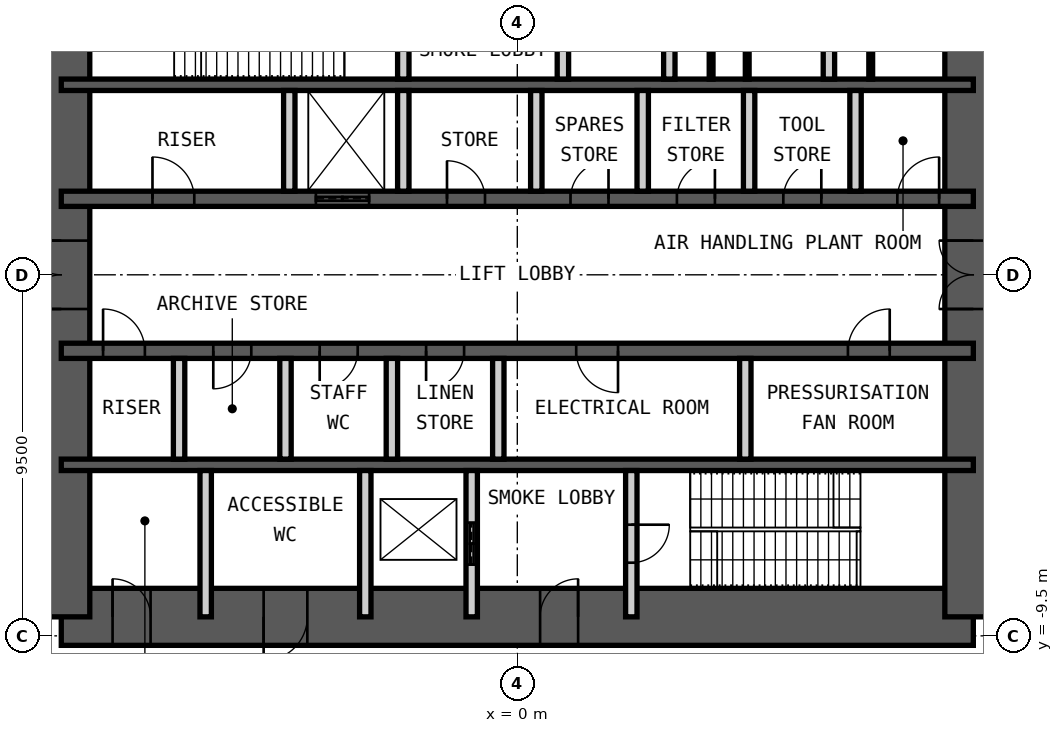
"""IFC4 building model, lengths in metres.
Left out: names, types, materials, properties, quantities, classifications, styles, units other than length and angle.
Written with IfcOpenShell. Run it as: python <this file> out.ifc"""

import sys

from ifc_helpers import new_model, si_unit, direction, frame, frame_2d, origin, place, context, subcontext, project, spatial, rectangle, extrude, element, fill, save


model = new_model("IFC4")
c1 = context("Model", 3, precision=1e-05, world=origin(), true_north=direction((0.0, 1.0)))
c2 = subcontext(c1, "Body", "Model", "MODEL_VIEW")
j1 = project(units=[si_unit("LENGTHUNIT", "METRE"), si_unit("PLANEANGLEUNIT", "RADIAN")], contexts=[c1])
p1 = place(None, origin())
s1 = spatial("IfcSite", under=j1, at=p1, CompositionType="ELEMENT")
p2 = place(p1, origin())
s2 = spatial("IfcBuilding", under=s1, at=p2, CompositionType="ELEMENT")
p3 = place(p2, frame((0.0, 0.0, -12.0)))
s3 = spatial("IfcBuildingStorey", under=s2, at=p3, CompositionType="ELEMENT", Elevation=-12.0)
p4 = place(p3, frame((-12.0, -9.0, -0.2), z_axis=(0.0, 0.0, 1.0), x_axis=(1.0, 0.0, 0.0)))
e1 = element("IfcWall", 1, at=p4, inside=s3, PredefinedType="SHEAR", context=c2, shape_type="SweptSolid", body=[
    extrude(rectangle(XDim=24.0, YDim=1.5, at=frame_2d((12.0, 0.0))), origin(), (0.0, 0.0, 1.0), 6.2),
])
p5 = place(p4, frame((1.35, 0.0, 0.2)))
e2 = element("IfcOpeningElement", 2, at=p5, cuts=e1, PredefinedType="OPENING", context=c2, shape_type="SweptSolid", body=[
    extrude(rectangle(XDim=1.0, YDim=2.1, at=frame_2d((0.5, 1.05))), frame((0.0, 0.76, 0.0), z_axis=(0.0, -1.0, 0.0), x_axis=(1.0, 0.0, 0.0)), (0.0, 0.0, 1.0), 1.52),
])
p6 = place(p4, frame((5.325, 0.0, 0.2)))
e3 = element("IfcOpeningElement", 3, at=p6, cuts=e1, PredefinedType="OPENING", context=c2, shape_type="SweptSolid", body=[
    extrude(rectangle(XDim=1.15, YDim=2.1, at=frame_2d((0.575, 1.05))), frame((0.0, 0.76, 0.0), z_axis=(0.0, -1.0, 0.0), x_axis=(1.0, 0.0, 0.0)), (0.0, 0.0, 1.0), 1.52),
])
p7 = place(p4, frame((12.6, 0.0, 0.2)))
e4 = element("IfcOpeningElement", 4, at=p7, cuts=e1, PredefinedType="OPENING", context=c2, shape_type="SweptSolid", body=[
    extrude(rectangle(XDim=1.0, YDim=2.1, at=frame_2d((0.5, 1.05))), frame((0.0, 0.76, 0.0), z_axis=(0.0, -1.0, 0.0), x_axis=(1.0, 0.0, 0.0)), (0.0, 0.0, 1.0), 1.52),
])
p8 = place(p3, frame((12.0, -9.0, -0.2), z_axis=(0.0, 0.0, 1.0), x_axis=(0.0, 1.0, 0.0)))
e5 = element("IfcWall", 5, at=p8, inside=s3, PredefinedType="SHEAR", context=c2, shape_type="SweptSolid", body=[
    extrude(rectangle(XDim=18.0, YDim=1.5, at=frame_2d((9.0, 0.0))), origin(), (0.0, 0.0, 1.0), 6.2),
])
p9 = place(p8, frame((8.1, 0.0, 0.2)))
e6 = element("IfcOpeningElement", 6, at=p9, cuts=e5, PredefinedType="OPENING", context=c2, shape_type="SweptSolid", body=[
    extrude(rectangle(XDim=1.8, YDim=2.1, at=frame_2d((0.9, 1.05))), frame((0.0, 0.76, 0.0), z_axis=(0.0, -1.0, 0.0), x_axis=(1.0, 0.0, 0.0)), (0.0, 0.0, 1.0), 1.52),
])
p10 = place(p3, frame((-12.0, -9.0, -0.2), z_axis=(0.0, 0.0, 1.0), x_axis=(0.0, 1.0, 0.0)))
e7 = element("IfcWall", 7, at=p10, inside=s3, PredefinedType="SHEAR", context=c2, shape_type="SweptSolid", body=[
    extrude(rectangle(XDim=18.0, YDim=1.5, at=frame_2d((9.0, 0.0))), origin(), (0.0, 0.0, 1.0), 6.2),
])
p11 = place(p10, frame((8.1, 0.0, 0.2)))
e8 = element("IfcOpeningElement", 8, at=p11, cuts=e7, PredefinedType="OPENING", context=c2, shape_type="SweptSolid", body=[
    extrude(rectangle(XDim=1.8, YDim=2.1, at=frame_2d((0.9, 1.05))), frame((0.0, 0.76, 0.0), z_axis=(0.0, -1.0, 0.0), x_axis=(1.0, 0.0, 0.0)), (0.0, 0.0, 1.0), 1.52),
])
p12 = place(p3, frame((-12.0, 5.0, -0.2), z_axis=(0.0, 0.0, 1.0), x_axis=(1.0, 0.0, 0.0)))
e9 = element("IfcWall", 9, at=p12, inside=s3, PredefinedType="SHEAR", context=c2, shape_type="SweptSolid", body=[
    extrude(rectangle(XDim=24.0, YDim=0.3, at=frame_2d((12.0, 0.0))), origin(), (0.0, 0.0, 1.0), 6.2),
])
p13 = place(p3, frame((-12.0, 2.0, -0.2), z_axis=(0.0, 0.0, 1.0), x_axis=(1.0, 0.0, 0.0)))
e10 = element("IfcWall", 10, at=p13, inside=s3, PredefinedType="SHEAR", context=c2, shape_type="SweptSolid", body=[
    extrude(rectangle(XDim=24.0, YDim=0.4, at=frame_2d((12.0, 0.0))), origin(), (0.0, 0.0, 1.0), 6.2),
])
p14 = place(p13, frame((2.4, 0.0, 0.2)))
e11 = element("IfcOpeningElement", 11, at=p14, cuts=e10, PredefinedType="OPENING", context=c2, shape_type="SweptSolid", body=[
    extrude(rectangle(XDim=1.1, YDim=2.1, at=frame_2d((0.55, 1.05))), frame((0.0, 0.21, 0.0), z_axis=(0.0, -1.0, 0.0), x_axis=(1.0, 0.0, 0.0)), (0.0, 0.0, 1.0), 0.42),
])
p15 = place(p13, frame((22.0, 0.0, 0.2)))
e12 = element("IfcOpeningElement", 12, at=p15, cuts=e10, PredefinedType="OPENING", context=c2, shape_type="SweptSolid", body=[
    extrude(rectangle(XDim=1.1, YDim=2.1, at=frame_2d((0.55, 1.05))), frame((0.0, 0.21, 0.0), z_axis=(0.0, -1.0, 0.0), x_axis=(1.0, 0.0, 0.0)), (0.0, 0.0, 1.0), 0.42),
])
p16 = place(p13, frame((10.15, 0.0, 0.2)))
e13 = element("IfcOpeningElement", 13, at=p16, cuts=e10, PredefinedType="OPENING", context=c2, shape_type="SweptSolid", body=[
    extrude(rectangle(XDim=1.0, YDim=2.1, at=frame_2d((0.5, 1.05))), frame((0.0, 0.21, 0.0), z_axis=(0.0, -1.0, 0.0), x_axis=(1.0, 0.0, 0.0)), (0.0, 0.0, 1.0), 0.42),
])
p17 = place(p13, frame((6.7, 0.0, 0.2)))
e14 = element("IfcOpeningElement", 14, at=p17, cuts=e10, PredefinedType="OPENING", context=c2, shape_type="SweptSolid", body=[
    extrude(rectangle(XDim=1.4, YDim=2.4, at=frame_2d((0.7, 1.2))), frame((0.0, 0.21, 0.0), z_axis=(0.0, -1.0, 0.0), x_axis=(1.0, 0.0, 0.0)), (0.0, 0.0, 1.0), 0.42),
])
p18 = place(p13, frame((13.4, 0.0, 0.2)))
e15 = element("IfcOpeningElement", 15, at=p18, cuts=e10, PredefinedType="OPENING", context=c2, shape_type="SweptSolid", body=[
    extrude(rectangle(XDim=1.0, YDim=2.1, at=frame_2d((0.5, 1.05))), frame((0.0, 0.21, 0.0), z_axis=(0.0, -1.0, 0.0), x_axis=(1.0, 0.0, 0.0)), (0.0, 0.0, 1.0), 0.42),
])
p19 = place(p13, frame((16.2, 0.0, 0.2)))
e16 = element("IfcOpeningElement", 16, at=p19, cuts=e10, PredefinedType="OPENING", context=c2, shape_type="SweptSolid", body=[
    extrude(rectangle(XDim=1.0, YDim=2.1, at=frame_2d((0.5, 1.05))), frame((0.0, 0.21, 0.0), z_axis=(0.0, -1.0, 0.0), x_axis=(1.0, 0.0, 0.0)), (0.0, 0.0, 1.0), 0.42),
])
p20 = place(p13, frame((19.0, 0.0, 0.2)))
e17 = element("IfcOpeningElement", 17, at=p20, cuts=e10, PredefinedType="OPENING", context=c2, shape_type="SweptSolid", body=[
    extrude(rectangle(XDim=1.0, YDim=2.1, at=frame_2d((0.5, 1.05))), frame((0.0, 0.21, 0.0), z_axis=(0.0, -1.0, 0.0), x_axis=(1.0, 0.0, 0.0)), (0.0, 0.0, 1.0), 0.42),
])
p21 = place(p3, frame((-12.0, -2.0, -0.2), z_axis=(0.0, 0.0, 1.0), x_axis=(1.0, 0.0, 0.0)))
e18 = element("IfcWall", 18, at=p21, inside=s3, PredefinedType="SHEAR", context=c2, shape_type="SweptSolid", body=[
    extrude(rectangle(XDim=24.0, YDim=0.4, at=frame_2d((12.0, 0.0))), origin(), (0.0, 0.0, 1.0), 6.2),
])
p22 = place(p21, frame((1.1, 0.0, 0.2)))
e19 = element("IfcOpeningElement", 19, at=p22, cuts=e18, PredefinedType="OPENING", context=c2, shape_type="SweptSolid", body=[
    extrude(rectangle(XDim=1.1, YDim=2.1, at=frame_2d((0.55, 1.05))), frame((0.0, 0.21, 0.0), z_axis=(0.0, -1.0, 0.0), x_axis=(1.0, 0.0, 0.0)), (0.0, 0.0, 1.0), 0.42),
])
p23 = place(p21, frame((13.55, 0.0, 0.2)))
e20 = element("IfcOpeningElement", 20, at=p23, cuts=e18, PredefinedType="OPENING", context=c2, shape_type="SweptSolid", body=[
    extrude(rectangle(XDim=1.1, YDim=2.1, at=frame_2d((0.55, 1.05))), frame((0.0, 0.21, 0.0), z_axis=(0.0, -1.0, 0.0), x_axis=(1.0, 0.0, 0.0)), (0.0, 0.0, 1.0), 0.42),
])
p24 = place(p21, frame((20.7, 0.0, 0.2)))
e21 = element("IfcOpeningElement", 21, at=p24, cuts=e18, PredefinedType="OPENING", context=c2, shape_type="SweptSolid", body=[
    extrude(rectangle(XDim=1.1, YDim=2.1, at=frame_2d((0.55, 1.05))), frame((0.0, 0.21, 0.0), z_axis=(0.0, -1.0, 0.0), x_axis=(1.0, 0.0, 0.0)), (0.0, 0.0, 1.0), 0.42),
])
p25 = place(p21, frame((4.0, 0.0, 0.2)))
e22 = element("IfcOpeningElement", 22, at=p25, cuts=e18, PredefinedType="OPENING", context=c2, shape_type="SweptSolid", body=[
    extrude(rectangle(XDim=1.0, YDim=2.1, at=frame_2d((0.5, 1.05))), frame((0.0, 0.21, 0.0), z_axis=(0.0, -1.0, 0.0), x_axis=(1.0, 0.0, 0.0)), (0.0, 0.0, 1.0), 0.42),
])
p26 = place(p21, frame((6.8, 0.0, 0.2)))
e23 = element("IfcOpeningElement", 23, at=p26, cuts=e18, PredefinedType="OPENING", context=c2, shape_type="SweptSolid", body=[
    extrude(rectangle(XDim=1.0, YDim=2.1, at=frame_2d((0.5, 1.05))), frame((0.0, 0.21, 0.0), z_axis=(0.0, -1.0, 0.0), x_axis=(1.0, 0.0, 0.0)), (0.0, 0.0, 1.0), 0.42),
])
p27 = place(p21, frame((9.6, 0.0, 0.2)))
e24 = element("IfcOpeningElement", 24, at=p27, cuts=e18, PredefinedType="OPENING", context=c2, shape_type="SweptSolid", body=[
    extrude(rectangle(XDim=1.0, YDim=2.1, at=frame_2d((0.5, 1.05))), frame((0.0, 0.21, 0.0), z_axis=(0.0, -1.0, 0.0), x_axis=(1.0, 0.0, 0.0)), (0.0, 0.0, 1.0), 0.42),
])
p28 = place(p3, frame((-12.0, -5.0, -0.2), z_axis=(0.0, 0.0, 1.0), x_axis=(1.0, 0.0, 0.0)))
e25 = element("IfcWall", 25, at=p28, inside=s3, PredefinedType="SHEAR", context=c2, shape_type="SweptSolid", body=[
    extrude(rectangle(XDim=24.0, YDim=0.3, at=frame_2d((12.0, 0.0))), origin(), (0.0, 0.0, 1.0), 6.2),
])
p29 = place(p3, frame((-3.0, 5.15, 0.0), z_axis=(0.0, 0.0, 1.0), x_axis=(0.0, 1.0, 0.0)))
e26 = element("IfcWall", 26, at=p29, inside=s3, PredefinedType="PARTITIONING", context=c2, shape_type="SweptSolid", body=[
    extrude(rectangle(XDim=3.85, YDim=0.3, at=frame_2d((1.925, 0.0))), origin(), (0.0, 0.0, 1.0), 5.78),
])
p30 = place(p29, frame((1.425, 0.0, 0.0)))
e27 = element("IfcOpeningElement", 27, at=p30, cuts=e26, PredefinedType="OPENING", context=c2, shape_type="SweptSolid", body=[
    extrude(rectangle(XDim=1.0, YDim=2.1, at=frame_2d((0.5, 1.05))), frame((0.0, 0.16, 0.0), z_axis=(0.0, -1.0, 0.0), x_axis=(1.0, 0.0, 0.0)), (0.0, 0.0, 1.0), 0.32),
])
p31 = place(p3, frame((1.2, 5.15, 0.0), z_axis=(0.0, 0.0, 1.0), x_axis=(0.0, 1.0, 0.0)))
e28 = element("IfcWall", 28, at=p31, inside=s3, PredefinedType="PARTITIONING", context=c2, shape_type="SweptSolid", body=[
    extrude(rectangle(XDim=3.85, YDim=0.3, at=frame_2d((1.925, 0.0))), origin(), (0.0, 0.0, 1.0), 5.78),
])
p32 = place(p31, frame((1.375, 0.0, 0.0)))
e29 = element("IfcOpeningElement", 29, at=p32, cuts=e28, PredefinedType="OPENING", context=c2, shape_type="SweptSolid", body=[
    extrude(rectangle(XDim=1.1, YDim=2.4, at=frame_2d((0.55, 1.2))), frame((0.0, 0.16, 0.0), z_axis=(0.0, -1.0, 0.0), x_axis=(1.0, 0.0, 0.0)), (0.0, 0.0, 1.0), 0.32),
])
for number, where, z_axis, x_axis in (
    (30, (4.0, 5.15, 0.0), (0.0, 0.0, 1.0), (0.0, 1.0, 0.0)),
    (31, (8.2, 5.15, 0.0), (0.0, 0.0, 1.0), (0.0, 1.0, 0.0)),
):
    element("IfcWall", number, at=place(p3, frame(where, z_axis=z_axis, x_axis=x_axis)), inside=s3, PredefinedType="PARTITIONING", context=c2, shape_type="SweptSolid", body=[
        extrude(rectangle(XDim=3.85, YDim=0.3, at=frame_2d((1.925, 0.0))), origin(), (0.0, 0.0, 1.0), 5.78),
    ])
for number, where, z_axis, x_axis in (
    (32, (-6.0, 2.2, 0.0), (0.0, 0.0, 1.0), (0.0, 1.0, 0.0)),
    (33, (-3.0, 2.2, 0.0), (0.0, 0.0, 1.0), (0.0, 1.0, 0.0)),
    (34, (0.5, 2.2, 0.0), (0.0, 0.0, 1.0), (0.0, 1.0, 0.0)),
    (35, (3.3, 2.2, 0.0), (0.0, 0.0, 1.0), (0.0, 1.0, 0.0)),
    (36, (6.1, 2.2, 0.0), (0.0, 0.0, 1.0), (0.0, 1.0, 0.0)),
    (37, (8.9, 2.2, 0.0), (0.0, 0.0, 1.0), (0.0, 1.0, 0.0)),
    (38, (-8.9, -4.85, 0.0), (0.0, 0.0, 1.0), (0.0, 1.0, 0.0)),
    (39, (-6.1, -4.85, 0.0), (0.0, 0.0, 1.0), (0.0, 1.0, 0.0)),
    (40, (-3.3, -4.85, 0.0), (0.0, 0.0, 1.0), (0.0, 1.0, 0.0)),
    (41, (-0.5, -4.85, 0.0), (0.0, 0.0, 1.0), (0.0, 1.0, 0.0)),
    (42, (6.0, -4.85, 0.0), (0.0, 0.0, 1.0), (0.0, 1.0, 0.0)),
):
    element("IfcWall", number, at=place(p3, frame(where, z_axis=z_axis, x_axis=x_axis)), inside=s3, PredefinedType="PARTITIONING", context=c2, shape_type="SweptSolid", body=[
        extrude(rectangle(XDim=2.65, YDim=0.3, at=frame_2d((1.325, 0.0))), origin(), (0.0, 0.0, 1.0), 5.78),
    ])
for number, where, z_axis, x_axis in (
    (43, (-8.2, -9.0, 0.0), (0.0, 0.0, 1.0), (0.0, 1.0, 0.0)),
    (44, (-4.0, -9.0, 0.0), (0.0, 0.0, 1.0), (0.0, 1.0, 0.0)),
):
    element("IfcWall", number, at=place(p3, frame(where, z_axis=z_axis, x_axis=x_axis)), inside=s3, PredefinedType="PARTITIONING", context=c2, shape_type="SweptSolid", body=[
        extrude(rectangle(XDim=3.85, YDim=0.3, at=frame_2d((1.925, 0.0))), origin(), (0.0, 0.0, 1.0), 5.78),
    ])
p33 = place(p3, frame((-1.2, -9.0, 0.0), z_axis=(0.0, 0.0, 1.0), x_axis=(0.0, 1.0, 0.0)))
e45 = element("IfcWall", 45, at=p33, inside=s3, PredefinedType="PARTITIONING", context=c2, shape_type="SweptSolid", body=[
    extrude(rectangle(XDim=3.85, YDim=0.3, at=frame_2d((1.925, 0.0))), origin(), (0.0, 0.0, 1.0), 5.78),
])
p34 = place(p33, frame((1.375, 0.0, 0.0)))
e46 = element("IfcOpeningElement", 46, at=p34, cuts=e45, PredefinedType="OPENING", context=c2, shape_type="SweptSolid", body=[
    extrude(rectangle(XDim=1.1, YDim=2.4, at=frame_2d((0.55, 1.2))), frame((0.0, 0.16, 0.0), z_axis=(0.0, -1.0, 0.0), x_axis=(1.0, 0.0, 0.0)), (0.0, 0.0, 1.0), 0.32),
])
p35 = place(p3, frame((3.0, -9.0, 0.0), z_axis=(0.0, 0.0, 1.0), x_axis=(0.0, 1.0, 0.0)))
e47 = element("IfcWall", 47, at=p35, inside=s3, PredefinedType="PARTITIONING", context=c2, shape_type="SweptSolid", body=[
    extrude(rectangle(XDim=3.85, YDim=0.3, at=frame_2d((1.925, 0.0))), origin(), (0.0, 0.0, 1.0), 5.78),
])
p36 = place(p35, frame((1.425, 0.0, 0.0)))
e48 = element("IfcOpeningElement", 48, at=p36, cuts=e47, PredefinedType="OPENING", context=c2, shape_type="SweptSolid", body=[
    extrude(rectangle(XDim=1.0, YDim=2.1, at=frame_2d((0.5, 1.05))), frame((0.0, 0.16, 0.0), z_axis=(0.0, -1.0, 0.0), x_axis=(1.0, 0.0, 0.0)), (0.0, 0.0, 1.0), 0.32),
])
for number, where, z_axis, x_axis in (
    (49, (5.1, 5.15, 0.0), (0.0, 0.0, 1.0), (0.0, 1.0, 0.0)),
    (50, (6.05, 5.15, 0.0), (0.0, 0.0, 1.0), (0.0, 1.0, 0.0)),
    (51, (9.3, 5.15, 0.0), (0.0, 0.0, 1.0), (0.0, 1.0, 0.0)),
):
    element("IfcWall", number, at=place(p3, frame(where, z_axis=z_axis, x_axis=x_axis)), inside=s3, PredefinedType="PARTITIONING", context=c2, shape_type="SweptSolid", body=[
        extrude(rectangle(XDim=1.5, YDim=0.1, at=frame_2d((0.75, 0.0))), origin(), (0.0, 0.0, 1.0), 2.1),
    ])
p37 = place(p5, origin())
e52 = element("IfcDoor", 52, at=p37, inside=s3, OperationType="SINGLE_SWING_RIGHT", PredefinedType="DOOR", context=c2, shape_type="SweptSolid", body=[
    extrude(rectangle(XDim=1.0, YDim=2.1, at=frame_2d((0.5, 1.05))), frame((0.0, 0.025, 0.0), z_axis=(0.0, -1.0, 0.0), x_axis=(1.0, 0.0, 0.0)), (0.0, 0.0, 1.0), 0.05),
])
fill(e2, e52)
p38 = place(p6, origin())
e53 = element("IfcDoor", 53, at=p38, inside=s3, OperationType="SINGLE_SWING_LEFT", PredefinedType="DOOR", context=c2, shape_type="SweptSolid", body=[
    extrude(rectangle(XDim=1.15, YDim=2.1, at=frame_2d((0.575, 1.05))), frame((0.0, 0.025, 0.0), z_axis=(0.0, -1.0, 0.0), x_axis=(1.0, 0.0, 0.0)), (0.0, 0.0, 1.0), 0.05),
])
fill(e3, e53)
p39 = place(p7, origin())
e54 = element("IfcDoor", 54, at=p39, inside=s3, OperationType="SINGLE_SWING_LEFT", PredefinedType="DOOR", context=c2, shape_type="SweptSolid", body=[
    extrude(rectangle(XDim=1.0, YDim=2.1, at=frame_2d((0.5, 1.05))), frame((0.0, 0.025, 0.0), z_axis=(0.0, -1.0, 0.0), x_axis=(1.0, 0.0, 0.0)), (0.0, 0.0, 1.0), 0.05),
])
fill(e4, e54)
p40 = place(p36, origin())
e55 = element("IfcDoor", 55, at=p40, inside=s3, OperationType="SINGLE_SWING_RIGHT", PredefinedType="DOOR", context=c2, shape_type="SweptSolid", body=[
    extrude(rectangle(XDim=1.0, YDim=2.1, at=frame_2d((0.5, 1.05))), frame((0.0, 0.025, 0.0), z_axis=(0.0, -1.0, 0.0), x_axis=(1.0, 0.0, 0.0)), (0.0, 0.0, 1.0), 0.05),
])
fill(e48, e55)
p41 = place(p14, origin())
e56 = element("IfcDoor", 56, at=p41, inside=s3, OperationType="SINGLE_SWING_RIGHT", PredefinedType="DOOR", context=c2, shape_type="SweptSolid", body=[
    extrude(rectangle(XDim=1.1, YDim=2.1, at=frame_2d((0.55, 1.05))), frame((0.0, 0.025, 0.0), z_axis=(0.0, -1.0, 0.0), x_axis=(1.0, 0.0, 0.0)), (0.0, 0.0, 1.0), 0.05),
])
fill(e11, e56)
p42 = place(p22, origin())
e57 = element("IfcDoor", 57, at=p42, inside=s3, OperationType="SINGLE_SWING_RIGHT", PredefinedType="DOOR", context=c2, shape_type="SweptSolid", body=[
    extrude(rectangle(XDim=1.1, YDim=2.1, at=frame_2d((0.55, 1.05))), frame((0.0, 0.025, 0.0), z_axis=(0.0, -1.0, 0.0), x_axis=(1.0, 0.0, 0.0)), (0.0, 0.0, 1.0), 0.05),
])
fill(e19, e57)
p43 = place(p15, origin())
e58 = element("IfcDoor", 58, at=p43, inside=s3, OperationType="SINGLE_SWING_LEFT", PredefinedType="DOOR", context=c2, shape_type="SweptSolid", body=[
    extrude(rectangle(XDim=1.1, YDim=2.1, at=frame_2d((0.55, 1.05))), frame((0.0, 0.025, 0.0), z_axis=(0.0, -1.0, 0.0), x_axis=(1.0, 0.0, 0.0)), (0.0, 0.0, 1.0), 0.05),
])
fill(e12, e58)
p44 = place(p16, origin())
e59 = element("IfcDoor", 59, at=p44, inside=s3, OperationType="SINGLE_SWING_RIGHT", PredefinedType="DOOR", context=c2, shape_type="SweptSolid", body=[
    extrude(rectangle(XDim=1.0, YDim=2.1, at=frame_2d((0.5, 1.05))), frame((0.0, 0.025, 0.0), z_axis=(0.0, -1.0, 0.0), x_axis=(1.0, 0.0, 0.0)), (0.0, 0.0, 1.0), 0.05),
])
fill(e13, e59)
p45 = place(p23, origin())
e60 = element("IfcDoor", 60, at=p45, inside=s3, OperationType="SINGLE_SWING_RIGHT", PredefinedType="DOOR", context=c2, shape_type="SweptSolid", body=[
    extrude(rectangle(XDim=1.1, YDim=2.1, at=frame_2d((0.55, 1.05))), frame((0.0, 0.025, 0.0), z_axis=(0.0, -1.0, 0.0), x_axis=(1.0, 0.0, 0.0)), (0.0, 0.0, 1.0), 0.05),
])
fill(e20, e60)
p46 = place(p24, origin())
e61 = element("IfcDoor", 61, at=p46, inside=s3, OperationType="SINGLE_SWING_LEFT", PredefinedType="DOOR", context=c2, shape_type="SweptSolid", body=[
    extrude(rectangle(XDim=1.1, YDim=2.1, at=frame_2d((0.55, 1.05))), frame((0.0, 0.025, 0.0), z_axis=(0.0, -1.0, 0.0), x_axis=(1.0, 0.0, 0.0)), (0.0, 0.0, 1.0), 0.05),
])
fill(e21, e61)
p47 = place(p9, origin())
e62 = element("IfcDoor", 62, at=p47, inside=s3, OperationType="DOUBLE_DOOR_DOUBLE_SWING", PredefinedType="DOOR", context=c2, shape_type="SweptSolid", body=[
    extrude(rectangle(XDim=1.8, YDim=2.1, at=frame_2d((0.9, 1.05))), frame((0.0, 0.025, 0.0), z_axis=(0.0, -1.0, 0.0), x_axis=(1.0, 0.0, 0.0)), (0.0, 0.0, 1.0), 0.05),
])
fill(e6, e62)
p48 = place(p11, origin())
e63 = element("IfcDoor", 63, at=p48, inside=s3, OperationType="DOUBLE_DOOR_DOUBLE_SWING", PredefinedType="DOOR", context=c2, shape_type="SweptSolid", body=[
    extrude(rectangle(XDim=1.8, YDim=2.1, at=frame_2d((0.9, 1.05))), frame((0.0, 0.025, 0.0), z_axis=(0.0, -1.0, 0.0), x_axis=(1.0, 0.0, 0.0)), (0.0, 0.0, 1.0), 0.05),
])
fill(e8, e63)
p49 = place(p34, origin())
e64 = element("IfcDoor", 64, at=p49, inside=s3, OperationType="DOUBLE_DOOR_SLIDING", PredefinedType="DOOR", context=c2, shape_type="SweptSolid", body=[
    extrude(rectangle(XDim=1.1, YDim=2.4, at=frame_2d((0.55, 1.2))), frame((0.0, 0.025, 0.0), z_axis=(0.0, -1.0, 0.0), x_axis=(1.0, 0.0, 0.0)), (0.0, 0.0, 1.0), 0.05),
])
fill(e46, e64)
p50 = place(p17, origin())
e65 = element("IfcDoor", 65, at=p50, inside=s3, OperationType="DOUBLE_DOOR_SLIDING", PredefinedType="DOOR", context=c2, shape_type="SweptSolid", body=[
    extrude(rectangle(XDim=1.4, YDim=2.4, at=frame_2d((0.7, 1.2))), frame((0.0, 0.025, 0.0), z_axis=(0.0, -1.0, 0.0), x_axis=(1.0, 0.0, 0.0)), (0.0, 0.0, 1.0), 0.05),
])
fill(e14, e65)
p51 = place(p18, origin())
e66 = element("IfcDoor", 66, at=p51, inside=s3, OperationType="SINGLE_SWING_LEFT", PredefinedType="DOOR", context=c2, shape_type="SweptSolid", body=[
    extrude(rectangle(XDim=1.0, YDim=2.1, at=frame_2d((0.5, 1.05))), frame((0.0, 0.025, 0.0), z_axis=(0.0, -1.0, 0.0), x_axis=(1.0, 0.0, 0.0)), (0.0, 0.0, 1.0), 0.05),
])
fill(e15, e66)
p52 = place(p19, origin())
e67 = element("IfcDoor", 67, at=p52, inside=s3, OperationType="SINGLE_SWING_LEFT", PredefinedType="DOOR", context=c2, shape_type="SweptSolid", body=[
    extrude(rectangle(XDim=1.0, YDim=2.1, at=frame_2d((0.5, 1.05))), frame((0.0, 0.025, 0.0), z_axis=(0.0, -1.0, 0.0), x_axis=(1.0, 0.0, 0.0)), (0.0, 0.0, 1.0), 0.05),
])
fill(e16, e67)
p53 = place(p20, origin())
e68 = element("IfcDoor", 68, at=p53, inside=s3, OperationType="SINGLE_SWING_LEFT", PredefinedType="DOOR", context=c2, shape_type="SweptSolid", body=[
    extrude(rectangle(XDim=1.0, YDim=2.1, at=frame_2d((0.5, 1.05))), frame((0.0, 0.025, 0.0), z_axis=(0.0, -1.0, 0.0), x_axis=(1.0, 0.0, 0.0)), (0.0, 0.0, 1.0), 0.05),
])
fill(e17, e68)
p54 = place(p25, origin())
e69 = element("IfcDoor", 69, at=p54, inside=s3, OperationType="SINGLE_SWING_LEFT", PredefinedType="DOOR", context=c2, shape_type="SweptSolid", body=[
    extrude(rectangle(XDim=1.0, YDim=2.1, at=frame_2d((0.5, 1.05))), frame((0.0, 0.025, 0.0), z_axis=(0.0, -1.0, 0.0), x_axis=(1.0, 0.0, 0.0)), (0.0, 0.0, 1.0), 0.05),
])
fill(e22, e69)
p55 = place(p26, origin())
e70 = element("IfcDoor", 70, at=p55, inside=s3, OperationType="SINGLE_SWING_LEFT", PredefinedType="DOOR", context=c2, shape_type="SweptSolid", body=[
    extrude(rectangle(XDim=1.0, YDim=2.1, at=frame_2d((0.5, 1.05))), frame((0.0, 0.025, 0.0), z_axis=(0.0, -1.0, 0.0), x_axis=(1.0, 0.0, 0.0)), (0.0, 0.0, 1.0), 0.05),
])
fill(e23, e70)
p56 = place(p27, origin())
e71 = element("IfcDoor", 71, at=p56, inside=s3, OperationType="SINGLE_SWING_LEFT", PredefinedType="DOOR", context=c2, shape_type="SweptSolid", body=[
    extrude(rectangle(XDim=1.0, YDim=2.1, at=frame_2d((0.5, 1.05))), frame((0.0, 0.025, 0.0), z_axis=(0.0, -1.0, 0.0), x_axis=(1.0, 0.0, 0.0)), (0.0, 0.0, 1.0), 0.05),
])
fill(e24, e71)
save(model, sys.argv[1])
